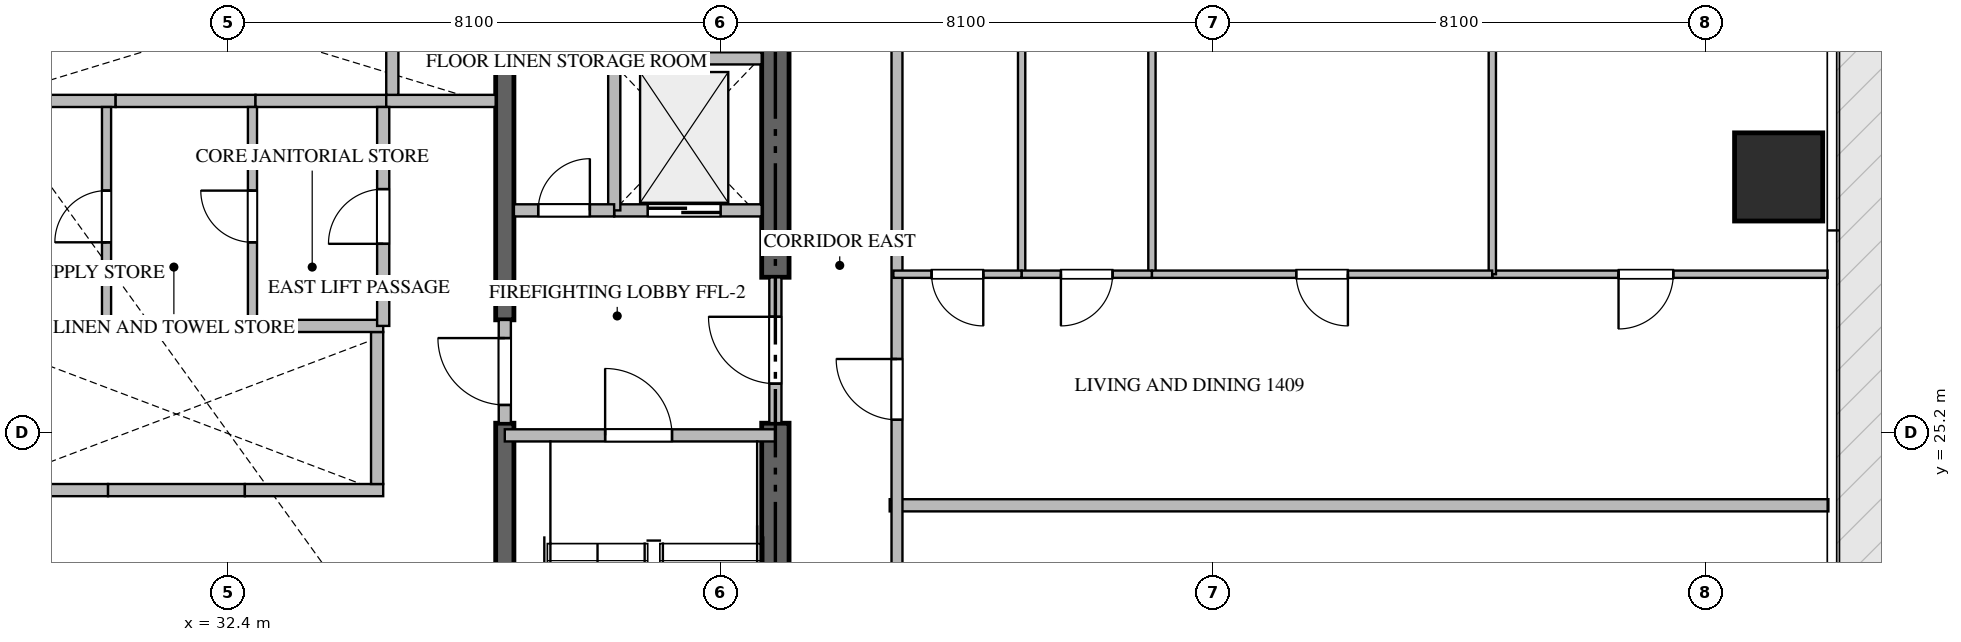
"""IFC4 building model, lengths in metres.
Left out: names, types, materials, properties, quantities, classifications, styles, units other than length and angle.
Written with IfcOpenShell. Run it as: python <this file> out.ifc"""

import sys

from ifc_helpers import new_model, si_unit, direction, frame, frame_2d, origin, origin_2d, place, context, subcontext, project, spatial, rectangle, extrude, source, transform, mapped, element, fill, save


model = new_model("IFC4")
c1 = context("Model", 3, precision=1e-05, world=origin(), true_north=direction((0.0, 1.0)))
c2 = subcontext(c1, "Body", "Model", "MODEL_VIEW")
j1 = project(units=[si_unit("LENGTHUNIT", "METRE"), si_unit("PLANEANGLEUNIT", "RADIAN")], contexts=[c1])
p1 = place(None, origin())
s1 = spatial("IfcSite", under=j1, at=p1, CompositionType="ELEMENT")
p2 = place(p1, origin())
s2 = spatial("IfcBuilding", under=s1, at=p2, CompositionType="ELEMENT")
p3 = place(p2, frame((0.0, 0.0, 60.45)))
s3 = spatial("IfcBuildingStorey", under=s2, at=p3, CompositionType="ELEMENT", Elevation=60.45)
p4 = place(p3, frame((41.4, 17.025, -0.26), z_axis=(0.0, 0.0, 1.0), x_axis=(0.0, 1.0, 0.0)))
e1 = element("IfcWall", 1, at=p4, inside=s3, PredefinedType="SHEAR", context=c2, shape_type="SweptSolid", body=[
    extrude(rectangle(XDim=8.325, YDim=0.45, at=frame_2d((4.163, 0.0))), origin(), (0.0, 0.0, 1.0), 3.748),
])
p5 = place(p3, frame((41.4, 27.75, -0.26), z_axis=(0.0, 0.0, 1.0), x_axis=(0.0, 1.0, 0.0)))
e2 = element("IfcWall", 2, at=p5, inside=s3, PredefinedType="SHEAR", context=c2, shape_type="SweptSolid", body=[
    extrude(rectangle(XDim=5.625, YDim=0.45, at=frame_2d((2.812, 0.0))), origin(), (0.0, 0.0, 1.0), 3.748),
])
p6 = place(p3, frame((36.95, 17.025, -0.26), z_axis=(0.0, 0.0, 1.0), x_axis=(0.0, 1.0, 0.0)))
e3 = element("IfcWall", 3, at=p6, inside=s3, PredefinedType="SHEAR", context=c2, shape_type="SweptSolid", body=[
    extrude(rectangle(XDim=8.325, YDim=0.3, at=frame_2d((4.163, 0.0))), origin(), (0.0, 0.0, 1.0), 3.748),
])
p7 = place(p3, frame((36.95, 27.05, -0.26), z_axis=(0.0, 0.0, 1.0), x_axis=(0.0, 1.0, 0.0)))
e4 = element("IfcWall", 4, at=p7, inside=s3, PredefinedType="SHEAR", context=c2, shape_type="SweptSolid", body=[
    extrude(rectangle(XDim=6.325, YDim=0.3, at=frame_2d((3.163, 0.0))), origin(), (0.0, 0.0, 1.0), 3.748),
])
m1 = source(origin(), c2, "Body", "SweptSolid", [
    extrude(rectangle(XDim=1.45, YDim=1.45, at=origin_2d()), origin(), (0.0, 0.0, 1.0), 3.75),
])
p8 = place(p3, frame((57.9, 29.4, -0.26), z_axis=(0.0, 0.0, 1.0), x_axis=(1.0, 0.0, 0.0)))
e5 = element("IfcColumn", 5, at=p8, inside=s3, PredefinedType="COLUMN", context=c2, shape_type="MappedRepresentation", body=[
    mapped(m1, transform((0.0, 0.0, 0.0), scale=1.0)),
])
p9 = place(p3, frame((36.95, 25.15, 0.0), z_axis=(0.0, 0.0, 1.0), x_axis=(1.0, 0.0, 0.0)))
e6 = element("IfcWall", 6, at=p9, inside=s3, PredefinedType="STANDARD", context=c2, shape_type="SweptSolid", body=[
    extrude(rectangle(XDim=4.45, YDim=0.2, at=frame_2d((2.225, 0.0))), origin(), (0.0, 0.0, 1.0), 3.49),
])
p10 = place(p9, frame((1.65, 0.0, 0.0)))
e7 = element("IfcOpeningElement", 7, at=p10, cuts=e6, PredefinedType="OPENING", context=c2, shape_type="SweptSolid", body=[
    extrude(rectangle(XDim=1.1, YDim=2.15, at=frame_2d((0.55, 1.075))), frame((0.0, 0.11, 0.0), z_axis=(0.0, -1.0, 0.0), x_axis=(1.0, 0.0, 0.0)), (0.0, 0.0, 1.0), 0.22),
])
p11 = place(p3, frame((38.75, 28.85, 0.0), z_axis=(0.0, 0.0, 1.0), x_axis=(1.0, 0.0, 0.0)))
e8 = element("IfcWall", 8, at=p11, inside=s3, PredefinedType="STANDARD", context=c2, shape_type="SweptSolid", body=[
    extrude(rectangle(XDim=2.425, YDim=0.2, at=frame_2d((1.212, 0.0))), origin(), (0.0, 0.0, 1.0), 3.49),
])
p12 = place(p11, frame((0.55, 0.0, 0.0)))
e9 = element("IfcOpeningElement", 9, at=p12, cuts=e8, PredefinedType="OPENING", context=c2, shape_type="SweptSolid", body=[
    extrude(rectangle(XDim=1.2, YDim=2.2, at=frame_2d((0.6, 1.1))), frame((0.0, 0.11, 0.0), z_axis=(0.0, -1.0, 0.0), x_axis=(1.0, 0.0, 0.0)), (0.0, 0.0, 1.0), 0.22),
])
p13 = place(p3, frame((28.0, 24.25, 0.0), z_axis=(0.0, 0.0, 1.0), x_axis=(1.0, 0.0, 0.0)))
e10 = element("IfcWall", 10, at=p13, inside=s3, PredefinedType="STANDARD", context=c2, shape_type="SweptSolid", body=[
    extrude(rectangle(XDim=2.425, YDim=0.2, at=frame_2d((1.212, 0.0))), origin(), (0.0, 0.0, 1.0), 3.49),
])
p14 = place(p3, frame((30.425, 24.25, 0.0), z_axis=(0.0, 0.0, 1.0), x_axis=(1.0, 0.0, 0.0)))
e11 = element("IfcWall", 11, at=p14, inside=s3, PredefinedType="STANDARD", context=c2, shape_type="SweptSolid", body=[
    extrude(rectangle(XDim=2.25, YDim=0.2, at=frame_2d((1.125, 0.0))), origin(), (0.0, 0.0, 1.0), 3.49),
])
p15 = place(p3, frame((32.675, 24.25, 0.0), z_axis=(0.0, 0.0, 1.0), x_axis=(1.0, 0.0, 0.0)))
e12 = element("IfcWall", 12, at=p15, inside=s3, PredefinedType="STANDARD", context=c2, shape_type="SweptSolid", body=[
    extrude(rectangle(XDim=2.275, YDim=0.2, at=frame_2d((1.137, 0.0))), origin(), (0.0, 0.0, 1.0), 3.49),
])
p16 = place(p3, frame((34.85, 24.35, 0.0), z_axis=(0.0, 0.0, 1.0), x_axis=(0.0, 1.0, 0.0)))
e13 = element("IfcWall", 13, at=p16, inside=s3, PredefinedType="STANDARD", context=c2, shape_type="SweptSolid", body=[
    extrude(rectangle(XDim=2.5, YDim=0.2, at=frame_2d((1.25, 0.0))), origin(), (0.0, 0.0, 1.0), 3.49),
])
p17 = place(p3, frame((28.0, 30.65, 0.0), z_axis=(0.0, 0.0, 1.0), x_axis=(1.0, 0.0, 0.0)))
e14 = element("IfcWall", 14, at=p17, inside=s3, PredefinedType="STANDARD", context=c2, shape_type="SweptSolid", body=[
    extrude(rectangle(XDim=2.55, YDim=0.2, at=frame_2d((1.275, 0.0))), origin(), (0.0, 0.0, 1.0), 3.49),
])
p18 = place(p3, frame((30.55, 30.65, 0.0), z_axis=(0.0, 0.0, 1.0), x_axis=(1.0, 0.0, 0.0)))
e15 = element("IfcWall", 15, at=p18, inside=s3, PredefinedType="STANDARD", context=c2, shape_type="SweptSolid", body=[
    extrude(rectangle(XDim=2.3, YDim=0.2, at=frame_2d((1.15, 0.0))), origin(), (0.0, 0.0, 1.0), 3.49),
])
p19 = place(p3, frame((32.85, 30.65, 0.0), z_axis=(0.0, 0.0, 1.0), x_axis=(1.0, 0.0, 0.0)))
e16 = element("IfcWall", 16, at=p19, inside=s3, PredefinedType="STANDARD", context=c2, shape_type="SweptSolid", body=[
    extrude(rectangle(XDim=2.15, YDim=0.2, at=frame_2d((1.075, 0.0))), origin(), (0.0, 0.0, 1.0), 3.49),
])
p20 = place(p3, frame((35.0, 30.65, 0.0), z_axis=(0.0, 0.0, 1.0), x_axis=(1.0, 0.0, 0.0)))
e17 = element("IfcWall", 17, at=p20, inside=s3, PredefinedType="STANDARD", context=c2, shape_type="SweptSolid", body=[
    extrude(rectangle(XDim=1.8, YDim=0.2, at=frame_2d((0.9, 0.0))), origin(), (0.0, 0.0, 1.0), 3.49),
])
p21 = place(p3, frame((35.1, 30.75, 0.0), z_axis=(0.0, 0.0, 1.0), x_axis=(0.0, 1.0, 0.0)))
e18 = element("IfcWall", 18, at=p21, inside=s3, PredefinedType="STANDARD", context=c2, shape_type="SweptSolid", body=[
    extrude(rectangle(XDim=2.625, YDim=0.2, at=frame_2d((1.312, 0.0))), origin(), (0.0, 0.0, 1.0), 3.49),
])
p22 = place(p3, frame((38.75, 28.85, 0.0), z_axis=(0.0, 0.0, 1.0), x_axis=(0.0, 1.0, 0.0)))
e19 = element("IfcWall", 19, at=p22, inside=s3, PredefinedType="STANDARD", context=c2, shape_type="SweptSolid", body=[
    extrude(rectangle(XDim=2.5, YDim=0.2, at=frame_2d((1.25, 0.0))), origin(), (0.0, 0.0, 1.0), 3.49),
])
p23 = place(p3, frame((38.75, 31.35, 0.0), z_axis=(0.0, 0.0, 1.0), x_axis=(1.0, 0.0, 0.0)))
e20 = element("IfcWall", 20, at=p23, inside=s3, PredefinedType="STANDARD", context=c2, shape_type="SweptSolid", body=[
    extrude(rectangle(XDim=2.425, YDim=0.2, at=frame_2d((1.212, 0.0))), origin(), (0.0, 0.0, 1.0), 3.49),
])
p24 = place(p3, frame((37.1, 28.85, 0.0), z_axis=(0.0, 0.0, 1.0), x_axis=(1.0, 0.0, 0.0)))
e21 = element("IfcWall", 21, at=p24, inside=s3, PredefinedType="STANDARD", context=c2, shape_type="SweptSolid", body=[
    extrude(rectangle(XDim=1.648, YDim=0.2, at=frame_2d((0.824, 0.0))), origin(), (0.0, 0.0, 1.0), 3.49),
])
p25 = place(p24, frame((0.399, 0.0, 0.0)))
e22 = element("IfcOpeningElement", 22, at=p25, cuts=e21, PredefinedType="OPENING", context=c2, shape_type="SweptSolid", body=[
    extrude(rectangle(XDim=0.85, YDim=2.1, at=frame_2d((0.425, 1.05))), frame((0.0, 0.11, 0.0), z_axis=(0.0, -1.0, 0.0), x_axis=(1.0, 0.0, 0.0)), (0.0, 0.0, 1.0), 0.22),
])
p26 = place(p3, frame((41.4, 25.352, 0.0), z_axis=(0.0, 0.0, 1.0), x_axis=(0.0, 1.0, 0.0)))
e23 = element("IfcWall", 23, at=p26, inside=s3, PredefinedType="STANDARD", context=c2, shape_type="SweptSolid", body=[
    extrude(rectangle(XDim=2.396, YDim=0.2, at=frame_2d((1.198, 0.0))), origin(), (0.0, 0.0, 1.0), 3.49),
])
p27 = place(p26, frame((0.648, 0.0, 0.0)))
e24 = element("IfcOpeningElement", 24, at=p27, cuts=e23, PredefinedType="OPENING", context=c2, shape_type="SweptSolid", body=[
    extrude(rectangle(XDim=1.1, YDim=2.15, at=frame_2d((0.55, 1.075))), frame((0.0, 0.11, 0.0), z_axis=(0.0, -1.0, 0.0), x_axis=(1.0, 0.0, 0.0)), (0.0, 0.0, 1.0), 0.22),
])
p28 = place(p3, frame((36.95, 25.352, 0.0), z_axis=(0.0, 0.0, 1.0), x_axis=(0.0, 1.0, 0.0)))
e25 = element("IfcWall", 25, at=p28, inside=s3, PredefinedType="STANDARD", context=c2, shape_type="SweptSolid", body=[
    extrude(rectangle(XDim=1.696, YDim=0.2, at=frame_2d((0.848, 0.0))), origin(), (0.0, 0.0, 1.0), 3.49),
])
p29 = place(p28, frame((0.298, 0.0, 0.0)))
e26 = element("IfcOpeningElement", 26, at=p29, cuts=e25, PredefinedType="OPENING", context=c2, shape_type="SweptSolid", body=[
    extrude(rectangle(XDim=1.1, YDim=2.15, at=frame_2d((0.55, 1.075))), frame((0.0, 0.11, 0.0), z_axis=(0.0, -1.0, 0.0), x_axis=(1.0, 0.0, 0.0)), (0.0, 0.0, 1.0), 0.22),
])
p30 = place(p3, frame((28.0, 26.95, 0.0), z_axis=(0.0, 0.0, 1.0), x_axis=(1.0, 0.0, 0.0)))
e27 = element("IfcWall", 27, at=p30, inside=s3, PredefinedType="STANDARD", context=c2, shape_type="SweptSolid", body=[
    extrude(rectangle(XDim=6.95, YDim=0.2, at=frame_2d((3.475, 0.0))), origin(), (0.0, 0.0, 1.0), 3.49),
])
p31 = place(p3, frame((39.4, 31.35, 0.0), z_axis=(0.0, 0.0, 1.0), x_axis=(0.0, 1.0, 0.0)))
e28 = element("IfcWall", 28, at=p31, inside=s3, PredefinedType="PARTITIONING", context=c2, shape_type="SweptSolid", body=[
    extrude(rectangle(XDim=2.025, YDim=0.15, at=frame_2d((1.012, 0.0))), origin(), (0.0, 0.0, 1.0), 3.49),
])
p32 = place(p31, frame((0.587, 0.0, 0.0)))
e29 = element("IfcOpeningElement", 29, at=p32, cuts=e28, PredefinedType="OPENING", context=c2, shape_type="SweptSolid", body=[
    extrude(rectangle(XDim=0.85, YDim=2.1, at=frame_2d((0.425, 1.05))), frame((0.0, 0.085, 0.0), z_axis=(0.0, -1.0, 0.0), x_axis=(1.0, 0.0, 0.0)), (0.0, 0.0, 1.0), 0.17),
])
p33 = place(p3, frame((34.95, 26.95, 0.0), z_axis=(0.0, 0.0, 1.0), x_axis=(0.0, 1.0, 0.0)))
e30 = element("IfcWall", 30, at=p33, inside=s3, PredefinedType="STANDARD", context=c2, shape_type="SweptSolid", body=[
    extrude(rectangle(XDim=3.6, YDim=0.2, at=frame_2d((1.8, 0.0))), origin(), (0.0, 0.0, 1.0), 3.49),
])
p34 = place(p33, frame((1.35, 0.0, 0.0)))
e31 = element("IfcOpeningElement", 31, at=p34, cuts=e30, PredefinedType="OPENING", context=c2, shape_type="SweptSolid", body=[
    extrude(rectangle(XDim=0.9, YDim=2.1, at=frame_2d((0.45, 1.05))), frame((0.0, 0.11, 0.0), z_axis=(0.0, -1.0, 0.0), x_axis=(1.0, 0.0, 0.0)), (0.0, 0.0, 1.0), 0.22),
])
p35 = place(p3, frame((32.8, 26.95, 0.0), z_axis=(0.0, 0.0, 1.0), x_axis=(0.0, 1.0, 0.0)))
e32 = element("IfcWall", 32, at=p35, inside=s3, PredefinedType="PARTITIONING", context=c2, shape_type="SweptSolid", body=[
    extrude(rectangle(XDim=3.6, YDim=0.15, at=frame_2d((1.8, 0.0))), origin(), (0.0, 0.0, 1.0), 3.49),
])
p36 = place(p35, frame((1.375, 0.0, 0.0)))
e33 = element("IfcOpeningElement", 33, at=p36, cuts=e32, PredefinedType="OPENING", context=c2, shape_type="SweptSolid", body=[
    extrude(rectangle(XDim=0.85, YDim=2.1, at=frame_2d((0.425, 1.05))), frame((0.0, 0.085, 0.0), z_axis=(0.0, -1.0, 0.0), x_axis=(1.0, 0.0, 0.0)), (0.0, 0.0, 1.0), 0.17),
])
p37 = place(p3, frame((30.4, 26.95, 0.0), z_axis=(0.0, 0.0, 1.0), x_axis=(0.0, 1.0, 0.0)))
e34 = element("IfcWall", 34, at=p37, inside=s3, PredefinedType="PARTITIONING", context=c2, shape_type="SweptSolid", body=[
    extrude(rectangle(XDim=3.6, YDim=0.15, at=frame_2d((1.8, 0.0))), origin(), (0.0, 0.0, 1.0), 3.49),
])
p38 = place(p37, frame((1.375, 0.0, 0.0)))
e35 = element("IfcOpeningElement", 35, at=p38, cuts=e34, PredefinedType="OPENING", context=c2, shape_type="SweptSolid", body=[
    extrude(rectangle(XDim=0.85, YDim=2.1, at=frame_2d((0.425, 1.05))), frame((0.0, 0.085, 0.0), z_axis=(0.0, -1.0, 0.0), x_axis=(1.0, 0.0, 0.0)), (0.0, 0.0, 1.0), 0.17),
])
p39 = place(p3, frame((43.28, 24.0, 0.0), z_axis=(0.0, 0.0, 1.0), x_axis=(1.0, 0.0, 0.0)))
e36 = element("IfcWall", 36, at=p39, inside=s3, PredefinedType="PARTITIONING", context=c2, shape_type="SweptSolid", body=[
    extrude(rectangle(XDim=15.438, YDim=0.2, at=frame_2d((7.719, 0.0))), origin(), (0.0, 0.0, 1.0), 3.49),
])
p40 = place(p3, frame((43.4, 14.9, 0.0), z_axis=(0.0, 0.0, 1.0), x_axis=(0.0, 1.0, 0.0)))
e37 = element("IfcWall", 37, at=p40, inside=s3, PredefinedType="PARTITIONING", context=c2, shape_type="SweptSolid", body=[
    extrude(rectangle(XDim=20.6, YDim=0.18, at=frame_2d((10.3, 0.0))), origin(), (0.0, 0.0, 1.0), 3.49),
])
p41 = place(p40, frame((5.429, 0.0, 0.0)))
e38 = element("IfcOpeningElement", 38, at=p41, cuts=e37, PredefinedType="OPENING", context=c2, shape_type="SweptSolid", body=[
    extrude(rectangle(XDim=1.0, YDim=2.15, at=frame_2d((0.5, 1.075))), frame((0.0, 0.1, 0.0), z_axis=(0.0, -1.0, 0.0), x_axis=(1.0, 0.0, 0.0)), (0.0, 0.0, 1.0), 0.2),
])
p42 = place(p40, frame((10.506, 0.0, 0.0)))
e39 = element("IfcOpeningElement", 39, at=p42, cuts=e37, PredefinedType="OPENING", context=c2, shape_type="SweptSolid", body=[
    extrude(rectangle(XDim=1.0, YDim=2.15, at=frame_2d((0.5, 1.075))), frame((0.0, 0.1, 0.0), z_axis=(0.0, -1.0, 0.0), x_axis=(1.0, 0.0, 0.0)), (0.0, 0.0, 1.0), 0.2),
])
p43 = place(p3, frame((58.705, 27.8, 0.0), z_axis=(0.0, 0.0, 1.0), x_axis=(-1.0, 0.0, 0.0)))
e40 = element("IfcWall", 40, at=p43, inside=s3, PredefinedType="PARTITIONING", context=c2, shape_type="SweptSolid", body=[
    extrude(rectangle(XDim=5.514, YDim=0.12, at=frame_2d((2.757, 0.0))), origin(), (0.0, 0.0, 1.0), 3.49),
])
p44 = place(p43, frame((2.538, 0.0, 0.0)))
e41 = element("IfcOpeningElement", 41, at=p44, cuts=e40, PredefinedType="OPENING", context=c2, shape_type="SweptSolid", body=[
    extrude(rectangle(XDim=0.9, YDim=2.1, at=frame_2d((0.45, 1.05))), frame((0.0, 0.07, 0.0), z_axis=(0.0, -1.0, 0.0), x_axis=(1.0, 0.0, 0.0)), (0.0, 0.0, 1.0), 0.14),
])
for number, where, z_axis, x_axis in (
    (42, (53.191, 27.8, 0.0), (0.0, 0.0, 1.0), (0.0, 1.0, 0.0)),
    (43, (47.593, 27.8, 0.0), (0.0, 0.0, 1.0), (0.0, 1.0, 0.0)),
    (44, (45.45, 27.8, 0.0), (0.0, 0.0, 1.0), (0.0, 1.0, 0.0)),
):
    element("IfcWall", number, at=place(p3, frame(where, z_axis=z_axis, x_axis=x_axis)), inside=s3, PredefinedType="PARTITIONING", context=c2, shape_type="SweptSolid", body=[
        extrude(rectangle(XDim=7.76, YDim=0.12, at=frame_2d((3.88, 0.0))), origin(), (0.0, 0.0, 1.0), 3.49),
    ])
p45 = place(p3, frame((53.189, 27.8, 0.0), z_axis=(0.0, 0.0, 1.0), x_axis=(-1.0, 0.0, 0.0)))
e45 = element("IfcWall", 45, at=p45, inside=s3, PredefinedType="PARTITIONING", context=c2, shape_type="SweptSolid", body=[
    extrude(rectangle(XDim=5.596, YDim=0.12, at=frame_2d((2.798, 0.0))), origin(), (0.0, 0.0, 1.0), 3.49),
])
p46 = place(p45, frame((2.373, 0.0, 0.0)))
e46 = element("IfcOpeningElement", 46, at=p46, cuts=e45, PredefinedType="OPENING", context=c2, shape_type="SweptSolid", body=[
    extrude(rectangle(XDim=0.85, YDim=2.1, at=frame_2d((0.425, 1.05))), frame((0.0, 0.07, 0.0), z_axis=(0.0, -1.0, 0.0), x_axis=(1.0, 0.0, 0.0)), (0.0, 0.0, 1.0), 0.14),
])
p47 = place(p3, frame((47.591, 27.8, 0.0), z_axis=(0.0, 0.0, 1.0), x_axis=(-1.0, 0.0, 0.0)))
e47 = element("IfcWall", 47, at=p47, inside=s3, PredefinedType="PARTITIONING", context=c2, shape_type="SweptSolid", body=[
    extrude(rectangle(XDim=2.141, YDim=0.12, at=frame_2d((1.071, 0.0))), origin(), (0.0, 0.0, 1.0), 3.49),
])
p48 = place(p47, frame((0.645, 0.0, 0.0)))
e48 = element("IfcOpeningElement", 48, at=p48, cuts=e47, PredefinedType="OPENING", context=c2, shape_type="SweptSolid", body=[
    extrude(rectangle(XDim=0.85, YDim=2.1, at=frame_2d((0.425, 1.05))), frame((0.0, 0.07, 0.0), z_axis=(0.0, -1.0, 0.0), x_axis=(1.0, 0.0, 0.0)), (0.0, 0.0, 1.0), 0.14),
])
p49 = place(p3, frame((45.448, 27.8, 0.0), z_axis=(0.0, 0.0, 1.0), x_axis=(-1.0, 0.0, 0.0)))
e49 = element("IfcWall", 49, at=p49, inside=s3, PredefinedType="PARTITIONING", context=c2, shape_type="SweptSolid", body=[
    extrude(rectangle(XDim=2.108, YDim=0.12, at=frame_2d((1.054, 0.0))), origin(), (0.0, 0.0, 1.0), 3.49),
])
p50 = place(p49, frame((0.629, 0.0, 0.0)))
e50 = element("IfcOpeningElement", 50, at=p50, cuts=e49, PredefinedType="OPENING", context=c2, shape_type="SweptSolid", body=[
    extrude(rectangle(XDim=0.85, YDim=2.1, at=frame_2d((0.425, 1.05))), frame((0.0, 0.07, 0.0), z_axis=(0.0, -1.0, 0.0), x_axis=(1.0, 0.0, 0.0)), (0.0, 0.0, 1.0), 0.14),
])
m2 = source(origin(), c2, "Body", "SweptSolid", [
    extrude(rectangle(XDim=1.1, YDim=2.15, at=frame_2d((0.55, 1.075))), frame((0.0, 0.025, 0.0), z_axis=(0.0, -1.0, 0.0), x_axis=(1.0, 0.0, 0.0)), (0.0, 0.0, 1.0), 0.05),
])
p51 = place(p10, origin())
e51 = element("IfcDoor", 51, at=p51, inside=s3, OperationType="SINGLE_SWING_LEFT", PredefinedType="DOOR", context=c2, shape_type="MappedRepresentation", body=[
    mapped(m2, transform((0.0, 0.0, 0.0), scale=1.0)),
])
fill(e7, e51)
m3 = source(origin(), c2, "Body", "SweptSolid", [
    extrude(rectangle(XDim=1.2, YDim=2.2, at=frame_2d((0.6, 1.1))), frame((0.0, 0.025, 0.0), z_axis=(0.0, -1.0, 0.0), x_axis=(1.0, 0.0, 0.0)), (0.0, 0.0, 1.0), 0.05),
])
p52 = place(p12, origin())
e52 = element("IfcDoor", 52, at=p52, inside=s3, OperationType="DOUBLE_DOOR_SLIDING", PredefinedType="DOOR", context=c2, shape_type="MappedRepresentation", body=[
    mapped(m3, transform((0.0, 0.0, 0.0), scale=1.0)),
])
fill(e9, e52)
m4 = source(origin(), c2, "Body", "SweptSolid", [
    extrude(rectangle(XDim=0.85, YDim=2.1, at=frame_2d((0.425, 1.05))), frame((0.0, 0.025, 0.0), z_axis=(0.0, -1.0, 0.0), x_axis=(1.0, 0.0, 0.0)), (0.0, 0.0, 1.0), 0.05),
])
p53 = place(p25, origin())
e53 = element("IfcDoor", 53, at=p53, inside=s3, OperationType="SINGLE_SWING_RIGHT", PredefinedType="DOOR", context=c2, shape_type="MappedRepresentation", body=[
    mapped(m4, transform((0.0, 0.0, 0.0), scale=1.0)),
])
fill(e22, e53)
p54 = place(p27, origin())
e54 = element("IfcDoor", 54, at=p54, inside=s3, OperationType="SINGLE_SWING_RIGHT", PredefinedType="DOOR", context=c2, shape_type="MappedRepresentation", body=[
    mapped(m2, transform((0.0, 0.0, 0.0), scale=1.0)),
])
fill(e24, e54)
p55 = place(p29, origin())
e55 = element("IfcDoor", 55, at=p55, inside=s3, OperationType="SINGLE_SWING_RIGHT", PredefinedType="DOOR", context=c2, shape_type="MappedRepresentation", body=[
    mapped(m2, transform((0.0, 0.0, 0.0), scale=1.0)),
])
fill(e26, e55)
m5 = source(origin(), c2, "Body", "SweptSolid", [
    extrude(rectangle(XDim=0.9, YDim=2.1, at=frame_2d((0.45, 1.05))), frame((0.0, 0.025, 0.0), z_axis=(0.0, -1.0, 0.0), x_axis=(1.0, 0.0, 0.0)), (0.0, 0.0, 1.0), 0.05),
])
p56 = place(p34, origin())
e56 = element("IfcDoor", 56, at=p56, inside=s3, OperationType="SINGLE_SWING_LEFT", PredefinedType="DOOR", context=c2, shape_type="MappedRepresentation", body=[
    mapped(m5, transform((0.0, 0.0, 0.0), scale=1.0)),
])
fill(e31, e56)
p57 = place(p36, origin())
e57 = element("IfcDoor", 57, at=p57, inside=s3, OperationType="SINGLE_SWING_RIGHT", PredefinedType="DOOR", context=c2, shape_type="MappedRepresentation", body=[
    mapped(m4, transform((0.0, 0.0, 0.0), scale=1.0)),
])
fill(e33, e57)
p58 = place(p38, origin())
e58 = element("IfcDoor", 58, at=p58, inside=s3, OperationType="SINGLE_SWING_LEFT", PredefinedType="DOOR", context=c2, shape_type="MappedRepresentation", body=[
    mapped(m4, transform((0.0, 0.0, 0.0), scale=1.0)),
])
fill(e35, e58)
m6 = source(origin(), c2, "Body", "SweptSolid", [
    extrude(rectangle(XDim=1.0, YDim=2.15, at=frame_2d((0.5, 1.075))), frame((0.0, 0.025, 0.0), z_axis=(0.0, -1.0, 0.0), x_axis=(1.0, 0.0, 0.0)), (0.0, 0.0, 1.0), 0.05),
])
p59 = place(p42, origin())
e59 = element("IfcDoor", 59, at=p59, inside=s3, OperationType="SINGLE_SWING_RIGHT", PredefinedType="DOOR", context=c2, shape_type="MappedRepresentation", body=[
    mapped(m6, transform((0.0, 0.0, 0.0), scale=1.0)),
])
fill(e39, e59)
p60 = place(p44, origin())
e60 = element("IfcDoor", 60, at=p60, inside=s3, OperationType="SINGLE_SWING_RIGHT", PredefinedType="DOOR", context=c2, shape_type="MappedRepresentation", body=[
    mapped(m5, transform((0.0, 0.0, 0.0), scale=1.0)),
])
fill(e41, e60)
p61 = place(p46, origin())
e61 = element("IfcDoor", 61, at=p61, inside=s3, OperationType="SINGLE_SWING_LEFT", PredefinedType="DOOR", context=c2, shape_type="MappedRepresentation", body=[
    mapped(m4, transform((0.0, 0.0, 0.0), scale=1.0)),
])
fill(e46, e61)
p62 = place(p48, origin())
e62 = element("IfcDoor", 62, at=p62, inside=s3, OperationType="SINGLE_SWING_RIGHT", PredefinedType="DOOR", context=c2, shape_type="MappedRepresentation", body=[
    mapped(m4, transform((0.0, 0.0, 0.0), scale=1.0)),
])
fill(e48, e62)
p63 = place(p50, origin())
e63 = element("IfcDoor", 63, at=p63, inside=s3, OperationType="SINGLE_SWING_LEFT", PredefinedType="DOOR", context=c2, shape_type="MappedRepresentation", body=[
    mapped(m4, transform((0.0, 0.0, 0.0), scale=1.0)),
])
fill(e50, e63)
save(model, sys.argv[1])
